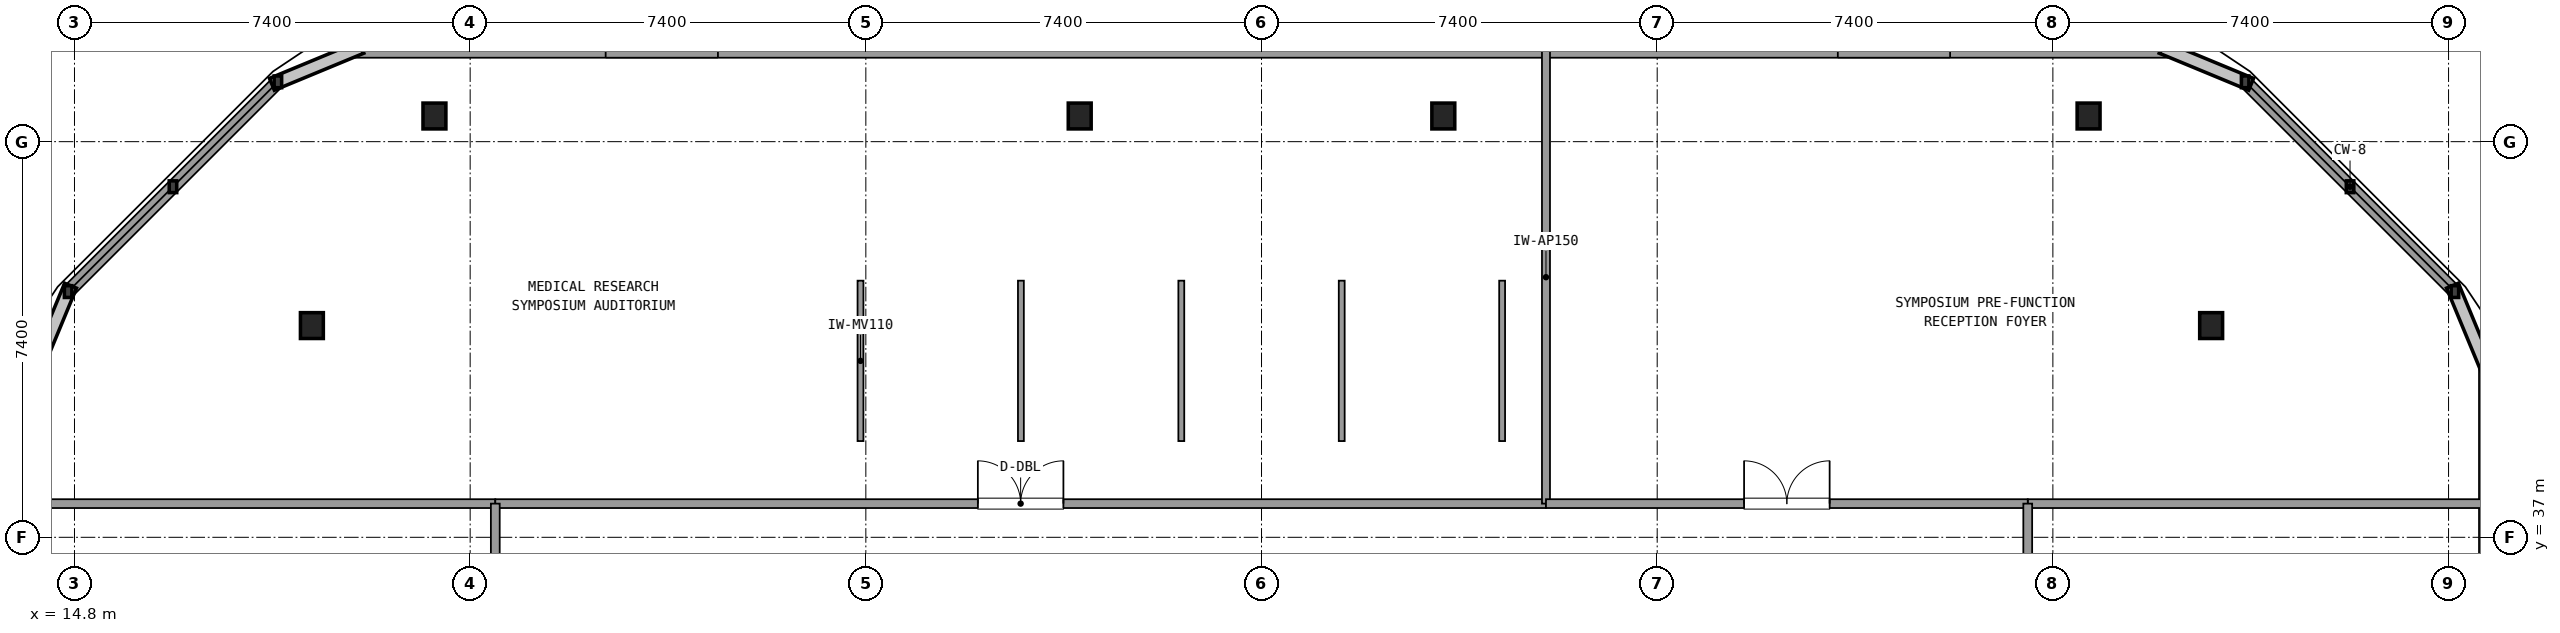
"""IFC4 building model, lengths in metres.
Left out: names, types, materials, properties, quantities, classifications, styles, units other than length and angle.
Written with IfcOpenShell. Run it as: python <this file> out.ifc"""

import sys

from ifc_helpers import new_model, si_unit, direction, frame, frame_2d, origin, origin_2d, place, context, subcontext, project, spatial, rectangle, i_section, extrude, element, fill, save


model = new_model("IFC4")
c1 = context("Model", 3, precision=1e-05, world=origin(), true_north=direction((0.0, 1.0)))
c2 = subcontext(c1, "Body", "Model", "MODEL_VIEW")
j1 = project(units=[si_unit("LENGTHUNIT", "METRE"), si_unit("PLANEANGLEUNIT", "RADIAN")], contexts=[c1])
p1 = place(None, origin())
s1 = spatial("IfcSite", under=j1, at=p1, CompositionType="ELEMENT")
p2 = place(p1, origin())
s2 = spatial("IfcBuilding", under=s1, at=p2, CompositionType="ELEMENT")
p3 = place(p2, frame((0.0, 0.0, 286.02)))
s3 = spatial("IfcBuildingStorey", under=s2, at=p3, CompositionType="ELEMENT", Elevation=286.02)
for number, where, z_axis, x_axis in (
    (1, (54.76, 40.96, 0.0), (0.0, 0.0, 1.0), (1.0, 0.0, 0.0)),
    (2, (52.468, 44.88, 0.0), (0.0, 0.0, 1.0), (1.0, 0.0, 0.0)),
    (3, (40.4, 44.88, 0.0), (0.0, 0.0, 1.0), (1.0, 0.0, 0.0)),
    (4, (33.6, 44.88, 0.0), (0.0, 0.0, 1.0), (1.0, 0.0, 0.0)),
    (5, (21.532, 44.88, 0.0), (0.0, 0.0, 1.0), (1.0, 0.0, 0.0)),
    (6, (19.24, 40.96, 0.0), (0.0, 0.0, 1.0), (1.0, 0.0, 0.0)),
):
    element("IfcColumn", number, at=place(p3, frame(where, z_axis=z_axis, x_axis=x_axis)), inside=s3, PredefinedType="COLUMN", context=c2, shape_type="SweptSolid", body=[
        extrude(i_section(OverallWidth=0.428, OverallDepth=0.483, WebThickness=0.042, FlangeThickness=0.068, at=origin_2d()), origin(), (0.0, 0.0, 1.0), 4.32),
    ])
p4 = place(p3, frame((59.92, 11.655, 0.0), z_axis=(0.0, 0.0, 1.0), x_axis=(0.0, 1.0, 0.0)))
e7 = element("IfcWall", 7, at=p4, inside=s3, PredefinedType="SOLIDWALL", context=c2, shape_type="SweptSolid", body=[
    extrude(rectangle(XDim=28.49, YDim=0.3, at=frame_2d((14.245, 0.0))), origin(), (0.0, 0.0, 1.0), 3.46),
])
p5 = place(p4, frame((7.122, 0.0, 0.85)))
e8 = element("IfcOpeningElement", 8, at=p5, cuts=e7, PredefinedType="OPENING", context=c2, shape_type="SweptSolid", body=[
    extrude(rectangle(XDim=1.5, YDim=1.65, at=frame_2d((0.75, 0.825))), frame((0.0, 0.16, 0.0), z_axis=(0.0, -1.0, 0.0), x_axis=(1.0, 0.0, 0.0)), (0.0, 0.0, 1.0), 0.32),
])
p6 = place(p4, frame((18.518, 0.0, 0.85)))
e9 = element("IfcOpeningElement", 9, at=p6, cuts=e7, PredefinedType="OPENING", context=c2, shape_type="SweptSolid", body=[
    extrude(rectangle(XDim=1.5, YDim=1.65, at=frame_2d((0.75, 0.825))), frame((0.0, 0.16, 0.0), z_axis=(0.0, -1.0, 0.0), x_axis=(1.0, 0.0, 0.0)), (0.0, 0.0, 1.0), 0.32),
])
p7 = place(p3, frame((59.319, 41.596, 0.0), z_axis=(0.0, 0.0, 1.0), x_axis=(-0.707106781187, 0.707106781187, 0.0)))
e10 = element("IfcWall", 10, at=p7, inside=s3, PredefinedType="SOLIDWALL", context=c2, shape_type="SweptSolid", body=[
    extrude(rectangle(XDim=5.548, YDim=0.24, at=frame_2d((2.774, 0.0))), origin(), (0.0, 0.0, 1.0), 0.85),
])
p8 = place(p3, frame((53.945, 46.12, 0.0), z_axis=(0.0, 0.0, 1.0), x_axis=(-1.0, 0.0, 0.0)))
e11 = element("IfcWall", 11, at=p8, inside=s3, PredefinedType="SOLIDWALL", context=c2, shape_type="SweptSolid", body=[
    extrude(rectangle(XDim=33.89, YDim=0.3, at=frame_2d((16.945, 0.0))), origin(), (0.0, 0.0, 1.0), 3.46),
])
p9 = place(p8, frame((4.067, 0.0, 0.85)))
e12 = element("IfcOpeningElement", 12, at=p9, cuts=e11, PredefinedType="OPENING", context=c2, shape_type="SweptSolid", body=[
    extrude(rectangle(XDim=2.1, YDim=1.65, at=frame_2d((1.05, 0.825))), frame((0.0, 0.16, 0.0), z_axis=(0.0, -1.0, 0.0), x_axis=(1.0, 0.0, 0.0)), (0.0, 0.0, 1.0), 0.32),
])
p10 = place(p8, frame((27.111, 0.0, 0.85)))
e13 = element("IfcOpeningElement", 13, at=p10, cuts=e11, PredefinedType="OPENING", context=c2, shape_type="SweptSolid", body=[
    extrude(rectangle(XDim=2.1, YDim=1.65, at=frame_2d((1.05, 0.825))), frame((0.0, 0.16, 0.0), z_axis=(0.0, -1.0, 0.0), x_axis=(1.0, 0.0, 0.0)), (0.0, 0.0, 1.0), 0.32),
])
p11 = place(p3, frame((18.604, 45.519, 0.0), z_axis=(0.0, 0.0, 1.0), x_axis=(-0.707106781187, -0.707106781187, 0.0)))
e14 = element("IfcWall", 14, at=p11, inside=s3, PredefinedType="SOLIDWALL", context=c2, shape_type="SweptSolid", body=[
    extrude(rectangle(XDim=5.548, YDim=0.24, at=frame_2d((2.774, 0.0))), origin(), (0.0, 0.0, 1.0), 0.85),
])
for number, where, z_axis, x_axis in (
    (15, (14.1, 37.63, 0.0), (0.0, 0.0, 1.0), (1.0, 0.0, 0.0)),
    (16, (51.33, 37.63, 0.0), (0.0, 0.0, 1.0), (1.0, 0.0, 0.0)),
):
    element("IfcWall", number, at=place(p3, frame(where, z_axis=z_axis, x_axis=x_axis)), inside=s3, PredefinedType="PARTITIONING", context=c2, shape_type="SweptSolid", body=[
        extrude(rectangle(XDim=8.57, YDim=0.165, at=frame_2d((4.285, 0.0))), origin(), (0.0, 0.0, 1.0), 2.93),
    ])
p12 = place(p3, frame((22.67, 37.63, 0.0), z_axis=(0.0, 0.0, 1.0), x_axis=(1.0, 0.0, 0.0)))
e17 = element("IfcWall", 17, at=p12, inside=s3, PredefinedType="PARTITIONING", context=c2, shape_type="SweptSolid", body=[
    extrude(rectangle(XDim=19.65, YDim=0.165, at=frame_2d((9.825, 0.0))), origin(), (0.0, 0.0, 1.0), 2.93),
])
p13 = place(p12, frame((9.025, 0.0, 0.0)))
e18 = element("IfcOpeningElement", 18, at=p13, cuts=e17, PredefinedType="OPENING", context=c2, shape_type="SweptSolid", body=[
    extrude(rectangle(XDim=1.6, YDim=2.2, at=frame_2d((0.8, 1.1))), frame((0.0, 0.093, 0.0), z_axis=(0.0, -1.0, 0.0), x_axis=(1.0, 0.0, 0.0)), (0.0, 0.0, 1.0), 0.185),
])
p14 = place(p3, frame((42.32, 37.63, 0.0), z_axis=(0.0, 0.0, 1.0), x_axis=(0.0, 1.0, 0.0)))
e19 = element("IfcWall", 19, at=p14, inside=s3, PredefinedType="PARTITIONING", context=c2, shape_type="SweptSolid", body=[
    extrude(rectangle(XDim=8.47, YDim=0.15, at=frame_2d((4.235, 0.0))), origin(), (0.0, 0.0, 1.0), 2.93),
])
p15 = place(p3, frame((42.32, 37.63, 0.0), z_axis=(0.0, 0.0, 1.0), x_axis=(1.0, 0.0, 0.0)))
e20 = element("IfcWall", 20, at=p15, inside=s3, PredefinedType="PARTITIONING", context=c2, shape_type="SweptSolid", body=[
    extrude(rectangle(XDim=9.01, YDim=0.165, at=frame_2d((4.505, 0.0))), origin(), (0.0, 0.0, 1.0), 2.93),
])
p16 = place(p15, frame((3.705, 0.0, 0.0)))
e21 = element("IfcOpeningElement", 21, at=p16, cuts=e20, PredefinedType="OPENING", context=c2, shape_type="SweptSolid", body=[
    extrude(rectangle(XDim=1.6, YDim=2.2, at=frame_2d((0.8, 1.1))), frame((0.0, 0.093, 0.0), z_axis=(0.0, -1.0, 0.0), x_axis=(1.0, 0.0, 0.0)), (0.0, 0.0, 1.0), 0.185),
])
p17 = place(p3, frame((22.67, 14.17, 0.0), z_axis=(0.0, 0.0, 1.0), x_axis=(0.0, 1.0, 0.0)))
e22 = element("IfcWall", 22, at=p17, inside=s3, PredefinedType="PARTITIONING", context=c2, shape_type="SweptSolid", body=[
    extrude(rectangle(XDim=23.46, YDim=0.165, at=frame_2d((11.73, 0.0))), origin(), (0.0, 0.0, 1.0), 2.93),
])
p18 = place(p17, frame((10.93, 0.0, 0.0)))
e23 = element("IfcOpeningElement", 23, at=p18, cuts=e22, PredefinedType="OPENING", context=c2, shape_type="SweptSolid", body=[
    extrude(rectangle(XDim=1.6, YDim=2.2, at=frame_2d((0.8, 1.1))), frame((0.0, 0.093, 0.0), z_axis=(0.0, -1.0, 0.0), x_axis=(1.0, 0.0, 0.0)), (0.0, 0.0, 1.0), 0.185),
])
p19 = place(p3, frame((51.33, 14.17, 0.0), z_axis=(0.0, 0.0, 1.0), x_axis=(0.0, 1.0, 0.0)))
e24 = element("IfcWall", 24, at=p19, inside=s3, PredefinedType="PARTITIONING", context=c2, shape_type="SweptSolid", body=[
    extrude(rectangle(XDim=23.46, YDim=0.165, at=frame_2d((11.73, 0.0))), origin(), (0.0, 0.0, 1.0), 2.93),
])
p20 = place(p19, frame((10.93, 0.0, 0.0)))
e25 = element("IfcOpeningElement", 25, at=p20, cuts=e24, PredefinedType="OPENING", context=c2, shape_type="SweptSolid", body=[
    extrude(rectangle(XDim=1.6, YDim=2.2, at=frame_2d((0.8, 1.1))), frame((0.0, 0.093, 0.0), z_axis=(0.0, -1.0, 0.0), x_axis=(1.0, 0.0, 0.0)), (0.0, 0.0, 1.0), 0.185),
])
for number, where, z_axis, x_axis in (
    (26, (29.5, 38.8, 0.0), (0.0, 0.0, 1.0), (0.0, 1.0, 0.0)),
    (27, (32.5, 38.8, 0.0), (0.0, 0.0, 1.0), (0.0, 1.0, 0.0)),
    (28, (35.5, 38.8, 0.0), (0.0, 0.0, 1.0), (0.0, 1.0, 0.0)),
    (29, (38.5, 38.8, 0.0), (0.0, 0.0, 1.0), (0.0, 1.0, 0.0)),
    (30, (41.5, 38.8, 0.0), (0.0, 0.0, 1.0), (0.0, 1.0, 0.0)),
):
    element("IfcWall", number, at=place(p3, frame(where, z_axis=z_axis, x_axis=x_axis)), inside=s3, PredefinedType="MOVABLE", context=c2, shape_type="SweptSolid", body=[
        extrude(rectangle(XDim=3.0, YDim=0.11, at=frame_2d((1.5, 0.0))), origin(), (0.0, 0.0, 1.0), 2.93),
    ])
p21 = place(p13, origin())
e31 = element("IfcDoor", 31, at=p21, inside=s3, OperationType="DOUBLE_DOOR_SINGLE_SWING", PredefinedType="DOOR", context=c2, shape_type="SweptSolid", body=[
    extrude(rectangle(XDim=1.6, YDim=2.2, at=frame_2d((0.8, 1.1))), frame((0.0, 0.025, 0.0), z_axis=(0.0, -1.0, 0.0), x_axis=(1.0, 0.0, 0.0)), (0.0, 0.0, 1.0), 0.05),
])
fill(e18, e31)
p22 = place(p16, origin())
e32 = element("IfcDoor", 32, at=p22, inside=s3, OperationType="DOUBLE_DOOR_SINGLE_SWING", PredefinedType="DOOR", context=c2, shape_type="SweptSolid", body=[
    extrude(rectangle(XDim=1.6, YDim=2.2, at=frame_2d((0.8, 1.1))), frame((0.0, 0.025, 0.0), z_axis=(0.0, -1.0, 0.0), x_axis=(1.0, 0.0, 0.0)), (0.0, 0.0, 1.0), 0.05),
])
fill(e21, e32)
save(model, sys.argv[1])
